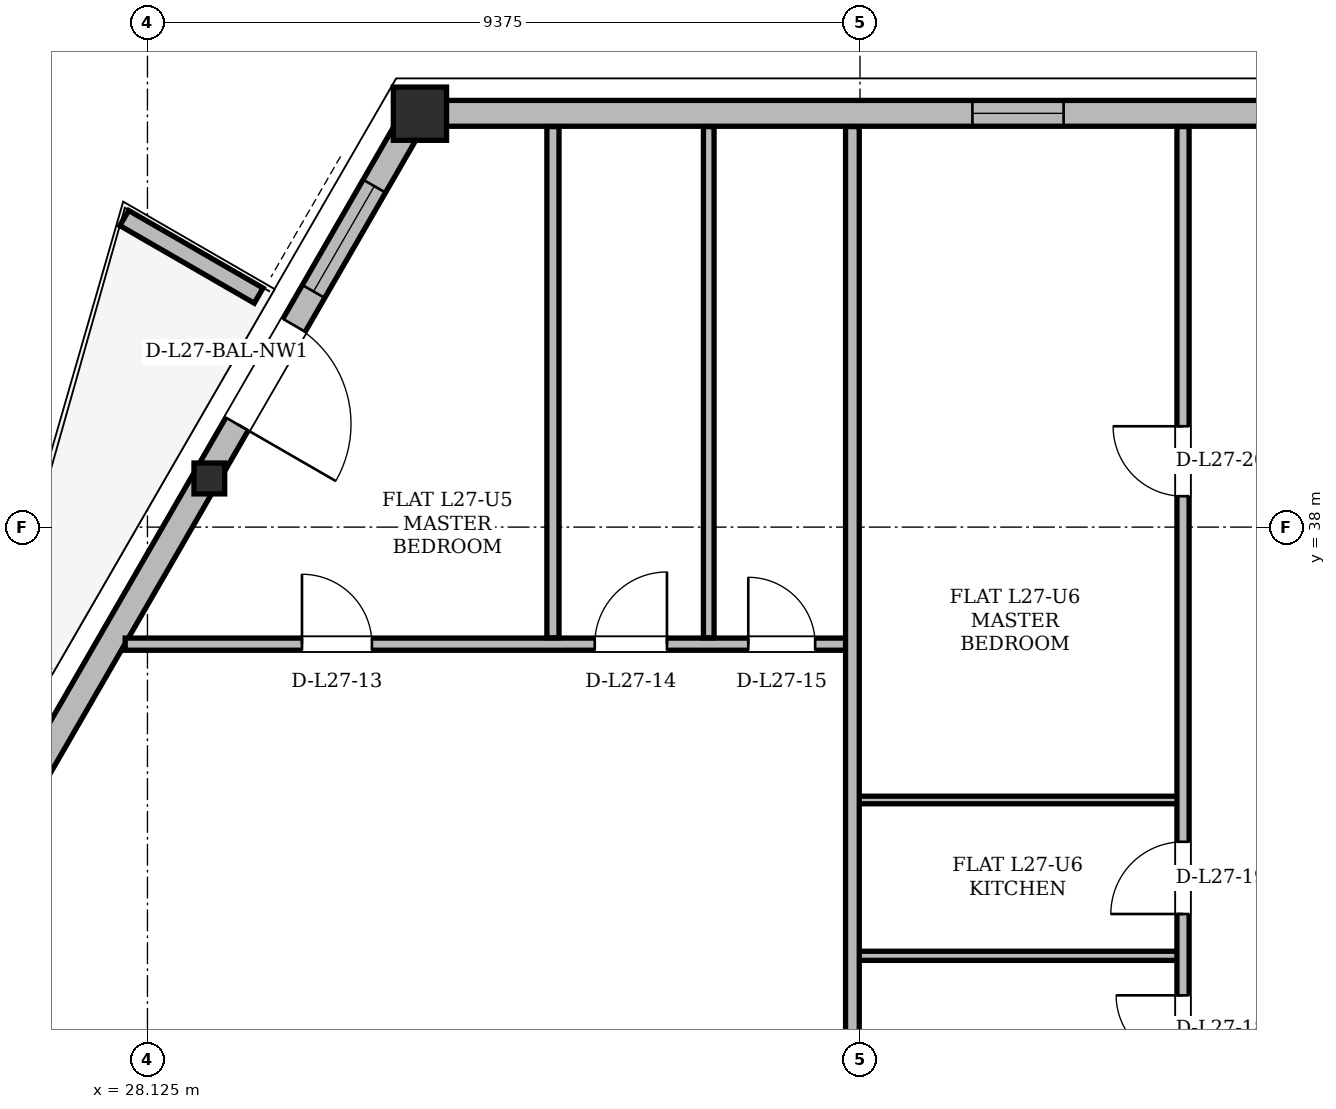
"""IFC4 building model, lengths in metres.
Left out: names, types, materials, properties, quantities, classifications, styles, units other than length and angle.
Written with IfcOpenShell. Run it as: python <this file> out.ifc"""

import sys

from ifc_helpers import new_model, si_unit, direction, frame, frame_2d, origin, origin_2d, place, context, subcontext, project, spatial, polyline, rectangle, hollow_rectangle, i_section, outline, extrude, element, fill, save


model = new_model("IFC4")
c1 = context("Model", 3, precision=1e-05, world=origin(), true_north=direction((0.0, 1.0)))
c2 = subcontext(c1, "Body", "Model", "MODEL_VIEW")
j1 = project(units=[si_unit("LENGTHUNIT", "METRE"), si_unit("PLANEANGLEUNIT", "RADIAN")], contexts=[c1])
p1 = place(None, origin())
s1 = spatial("IfcSite", under=j1, at=p1, CompositionType="ELEMENT")
p2 = place(p1, origin())
s2 = spatial("IfcBuilding", under=s1, at=p2, CompositionType="ELEMENT")
p3 = place(p2, frame((0.0, 0.0, 104.1)))
s3 = spatial("IfcBuildingStorey", under=s2, at=p3, CompositionType="ELEMENT", Elevation=104.1)
p4 = place(p3, frame((31.663, 43.444, 0.004), z_axis=(0.026165402281, -0.002582559186, 0.999654291299), x_axis=(0.098224011783, 0.995164329902, 0.0)))
e1 = element("IfcColumn", 1, at=p4, inside=s3, PredefinedType="COLUMN", context=c2, shape_type="SweptSolid", body=[
    extrude(hollow_rectangle(XDim=0.7, YDim=0.7, WallThickness=0.055, at=origin_2d()), origin(), (0.0, 0.0, 1.0), 3.592),
])
p5 = place(p3, frame((28.896, 38.65, 0.004), z_axis=(0.024399180592, -0.00557307189, 0.999686761369), x_axis=(0.222677327733, 0.974892203125, 0.0)))
e2 = element("IfcColumn", 2, at=p5, inside=s3, PredefinedType="COLUMN", context=c2, shape_type="SweptSolid", body=[
    extrude(i_section(OverallWidth=0.404, OverallDepth=0.406, WebThickness=0.027, FlangeThickness=0.044, at=origin_2d()), origin(), (0.0, 0.0, 1.0), 3.592),
])
p6 = place(p3, frame((43.337, 43.444, 0.0), z_axis=(0.0, 0.0, 1.0), x_axis=(-1.0, 0.0, 0.0)))
e3 = element("IfcWall", 3, at=p6, inside=s3, PredefinedType="SOLIDWALL", context=c2, shape_type="SweptSolid", body=[
    extrude(rectangle(XDim=11.674, YDim=0.34, at=frame_2d((5.837, 0.0))), origin(), (0.0, 0.0, 1.0), 2.578),
])
p7 = place(p6, frame((3.158, 0.0, 0.85)))
e4 = element("IfcOpeningElement", 4, at=p7, cuts=e3, PredefinedType="OPENING", context=c2, shape_type="SweptSolid", body=[
    extrude(rectangle(XDim=1.2, YDim=1.48, at=frame_2d((0.6, 0.74))), frame((0.0, 0.17, 0.0), z_axis=(0.0, -1.0, 0.0), x_axis=(1.0, 0.0, 0.0)), (0.0, 0.0, 1.0), 0.34),
])
p8 = place(p3, frame((31.663, 43.444, 0.0), z_axis=(0.0, 0.0, 1.0), x_axis=(-0.499998569178, -0.866026229868, 0.0)))
e5 = element("IfcWall", 5, at=p8, inside=s3, PredefinedType="SOLIDWALL", context=c2, shape_type="SweptSolid", body=[
    extrude(rectangle(XDim=34.595, YDim=0.34, at=frame_2d((17.298, 0.0))), origin(), (0.0, 0.0, 1.0), 2.578),
])
p9 = place(p8, frame((3.219, 0.0, 0.0)))
e6 = element("IfcOpeningElement", 6, at=p9, cuts=e5, PredefinedType="OPENING", context=c2, shape_type="SweptSolid", body=[
    extrude(rectangle(XDim=1.5, YDim=2.2, at=frame_2d((0.75, 1.1))), frame((0.0, 0.17, 0.0), z_axis=(0.0, -1.0, 0.0), x_axis=(1.0, 0.0, 0.0)), (0.0, 0.0, 1.0), 0.34),
])
p10 = place(p8, frame((25.061, 0.0, 0.0)))
e7 = element("IfcOpeningElement", 7, at=p10, cuts=e5, PredefinedType="OPENING", context=c2, shape_type="SweptSolid", body=[
    extrude(rectangle(XDim=1.5, YDim=2.2, at=frame_2d((0.75, 1.1))), frame((0.0, 0.17, 0.0), z_axis=(0.0, -1.0, 0.0), x_axis=(1.0, 0.0, 0.0)), (0.0, 0.0, 1.0), 0.34),
])
p11 = place(p8, frame((31.728, 0.0, 0.85)))
e8 = element("IfcOpeningElement", 8, at=p11, cuts=e5, PredefinedType="OPENING", context=c2, shape_type="SweptSolid", body=[
    extrude(rectangle(XDim=1.6, YDim=1.618, at=frame_2d((0.8, 0.809))), frame((0.0, 0.17, 0.0), z_axis=(0.0, -1.0, 0.0), x_axis=(1.0, 0.0, 0.0)), (0.0, 0.0, 1.0), 0.34),
])
p12 = place(p8, frame((26.86, 0.0, 0.85)))
e9 = element("IfcOpeningElement", 9, at=p12, cuts=e5, PredefinedType="OPENING", context=c2, shape_type="SweptSolid", body=[
    extrude(rectangle(XDim=1.2, YDim=1.48, at=frame_2d((0.6, 0.74))), frame((0.0, 0.17, 0.0), z_axis=(0.0, -1.0, 0.0), x_axis=(1.0, 0.0, 0.0)), (0.0, 0.0, 1.0), 0.34),
])
p13 = place(p8, frame((11.256, 0.0, 0.85)))
e10 = element("IfcOpeningElement", 10, at=p13, cuts=e5, PredefinedType="OPENING", context=c2, shape_type="SweptSolid", body=[
    extrude(rectangle(XDim=1.8, YDim=1.618, at=frame_2d((0.9, 0.809))), frame((0.0, 0.17, 0.0), z_axis=(0.0, -1.0, 0.0), x_axis=(1.0, 0.0, 0.0)), (0.0, 0.0, 1.0), 0.34),
])
p14 = place(p8, frame((18.593, 0.0, 0.85)))
e11 = element("IfcOpeningElement", 11, at=p14, cuts=e5, PredefinedType="OPENING", context=c2, shape_type="SweptSolid", body=[
    extrude(rectangle(XDim=1.2, YDim=1.48, at=frame_2d((0.6, 0.74))), frame((0.0, 0.17, 0.0), z_axis=(0.0, -1.0, 0.0), x_axis=(1.0, 0.0, 0.0)), (0.0, 0.0, 1.0), 0.34),
])
p15 = place(p8, frame((1.106, 0.0, 0.85)))
e12 = element("IfcOpeningElement", 12, at=p15, cuts=e5, PredefinedType="OPENING", context=c2, shape_type="SweptSolid", body=[
    extrude(rectangle(XDim=1.6, YDim=1.618, at=frame_2d((0.8, 0.809))), frame((0.0, 0.17, 0.0), z_axis=(0.0, -1.0, 0.0), x_axis=(1.0, 0.0, 0.0)), (0.0, 0.0, 1.0), 0.34),
])
p16 = place(p3, frame((29.588, 41.045, 0.0), z_axis=(0.0, 0.0, 1.0), x_axis=(-0.866012356593, 0.500022597718, 0.0)))
e13 = element("IfcWall", 13, at=p16, inside=s3, PredefinedType="PARAPET", context=c2, shape_type="SweptSolid", body=[
    extrude(outline(polyline([(0.0, 0.0), (2.042, 0.0), (2.042, 1.1), (0.0, 1.32), (0.0, 0.0)])), frame((0.0, 0.115, 0.0), z_axis=(0.0, -1.0, 0.0), x_axis=(1.0, 0.0, 0.0)), (0.0, 0.0, 1.0), 0.23),
])
p17 = place(p3, frame((37.35, 32.36, 0.0), z_axis=(0.0, 0.0, 1.0), x_axis=(1.0, 0.0, 0.0)))
e14 = element("IfcWall", 14, at=p17, inside=s3, PredefinedType="PARTITIONING", context=c2, shape_type="SweptSolid", body=[
    extrude(rectangle(XDim=4.4, YDim=0.12, at=frame_2d((2.2, 0.0))), origin(), (0.0, 0.0, 1.0), 3.36),
])
p18 = place(p3, frame((37.35, 34.41, 0.0), z_axis=(0.0, 0.0, 1.0), x_axis=(1.0, 0.0, 0.0)))
e15 = element("IfcWall", 15, at=p18, inside=s3, PredefinedType="PARTITIONING", context=c2, shape_type="SweptSolid", body=[
    extrude(rectangle(XDim=4.4, YDim=0.1, at=frame_2d((2.2, 0.0))), origin(), (0.0, 0.0, 1.0), 3.36),
])
p19 = place(p3, frame((27.832, 36.46, 0.0), z_axis=(0.0, 0.0, 1.0), x_axis=(1.0, 0.0, 0.0)))
e16 = element("IfcWall", 16, at=p19, inside=s3, PredefinedType="PARTITIONING", context=c2, shape_type="SweptSolid", body=[
    extrude(rectangle(XDim=9.618, YDim=0.16, at=frame_2d((4.809, 0.0))), origin(), (0.0, 0.0, 1.0), 2.814),
])
p20 = place(p19, frame((2.326, 0.0, 0.0)))
e17 = element("IfcOpeningElement", 17, at=p20, cuts=e16, PredefinedType="OPENING", context=c2, shape_type="SweptSolid", body=[
    extrude(rectangle(XDim=0.92, YDim=2.12, at=frame_2d((0.46, 1.06))), frame((0.0, 0.08, 0.0), z_axis=(0.0, -1.0, 0.0), x_axis=(1.0, 0.0, 0.0)), (0.0, 0.0, 1.0), 0.16),
])
p21 = place(p19, frame((6.178, 0.0, 0.0)))
e18 = element("IfcOpeningElement", 18, at=p21, cuts=e16, PredefinedType="OPENING", context=c2, shape_type="SweptSolid", body=[
    extrude(rectangle(XDim=0.95, YDim=2.1, at=frame_2d((0.475, 1.05))), frame((0.0, 0.08, 0.0), z_axis=(0.0, -1.0, 0.0), x_axis=(1.0, 0.0, 0.0)), (0.0, 0.0, 1.0), 0.16),
])
p22 = place(p19, frame((8.198, 0.0, 0.0)))
e19 = element("IfcOpeningElement", 19, at=p22, cuts=e16, PredefinedType="OPENING", context=c2, shape_type="SweptSolid", body=[
    extrude(rectangle(XDim=0.88, YDim=2.08, at=frame_2d((0.44, 1.04))), frame((0.0, 0.08, 0.0), z_axis=(0.0, -1.0, 0.0), x_axis=(1.0, 0.0, 0.0)), (0.0, 0.0, 1.0), 0.16),
])
p23 = place(p3, frame((33.46, 36.544, 0.0), z_axis=(0.0, 0.0, 1.0), x_axis=(0.0, 1.0, 0.0)))
e20 = element("IfcWall", 20, at=p23, inside=s3, PredefinedType="PARTITIONING", context=c2, shape_type="SweptSolid", body=[
    extrude(rectangle(XDim=6.726, YDim=0.16, at=frame_2d((3.363, 0.0))), origin(), (0.0, 0.0, 1.0), 3.36),
])
p24 = place(p3, frame((35.51, 36.544, 0.0), z_axis=(0.0, 0.0, 1.0), x_axis=(0.0, 1.0, 0.0)))
e21 = element("IfcWall", 21, at=p24, inside=s3, PredefinedType="PARTITIONING", context=c2, shape_type="SweptSolid", body=[
    extrude(rectangle(XDim=6.726, YDim=0.14, at=frame_2d((3.363, 0.0))), origin(), (0.0, 0.0, 1.0), 3.36),
])
p25 = place(p3, frame((37.4, 26.064, 0.0), z_axis=(0.0, 0.0, 1.0), x_axis=(0.0, 1.0, 0.0)))
e22 = element("IfcWall", 22, at=p25, inside=s3, PredefinedType="PARTITIONING", context=c2, shape_type="SweptSolid", body=[
    extrude(rectangle(XDim=17.206, YDim=0.18, at=frame_2d((8.603, 0.0))), origin(), (0.0, 0.0, 1.0), 3.36),
])
p26 = place(p3, frame((41.75, 30.564, 0.0), z_axis=(0.0, 0.0, 1.0), x_axis=(0.0, 1.0, 0.0)))
e23 = element("IfcWall", 23, at=p26, inside=s3, PredefinedType="PARTITIONING", context=c2, shape_type="SweptSolid", body=[
    extrude(rectangle(XDim=12.706, YDim=0.16, at=frame_2d((6.353, 0.0))), origin(), (0.0, 0.0, 1.0), 3.36),
])
p27 = place(p26, frame((0.396, 0.0, 0.0)))
e24 = element("IfcOpeningElement", 24, at=p27, cuts=e23, PredefinedType="OPENING", context=c2, shape_type="SweptSolid", body=[
    extrude(rectangle(XDim=0.88, YDim=2.08, at=frame_2d((0.44, 1.04))), frame((0.0, 0.08, 0.0), z_axis=(0.0, -1.0, 0.0), x_axis=(1.0, 0.0, 0.0)), (0.0, 0.0, 1.0), 0.16),
])
p28 = place(p26, frame((2.346, 0.0, 0.0)))
e25 = element("IfcOpeningElement", 25, at=p28, cuts=e23, PredefinedType="OPENING", context=c2, shape_type="SweptSolid", body=[
    extrude(rectangle(XDim=0.95, YDim=2.1, at=frame_2d((0.475, 1.05))), frame((0.0, 0.08, 0.0), z_axis=(0.0, -1.0, 0.0), x_axis=(1.0, 0.0, 0.0)), (0.0, 0.0, 1.0), 0.16),
])
p29 = place(p26, frame((7.843, 0.0, 0.0)))
e26 = element("IfcOpeningElement", 26, at=p29, cuts=e23, PredefinedType="OPENING", context=c2, shape_type="SweptSolid", body=[
    extrude(rectangle(XDim=0.92, YDim=2.12, at=frame_2d((0.46, 1.06))), frame((0.0, 0.08, 0.0), z_axis=(0.0, -1.0, 0.0), x_axis=(1.0, 0.0, 0.0)), (0.0, 0.0, 1.0), 0.16),
])
p30 = place(p9, origin())
e27 = element("IfcDoor", 27, at=p30, inside=s3, OperationType="SINGLE_SWING_RIGHT", PredefinedType="DOOR", context=c2, shape_type="SweptSolid", body=[
    extrude(rectangle(XDim=1.5, YDim=2.2, at=frame_2d((0.75, 1.1))), frame((0.0, 0.025, 0.0), z_axis=(0.0, -1.0, 0.0), x_axis=(1.0, 0.0, 0.0)), (0.0, 0.0, 1.0), 0.05),
])
fill(e6, e27)
p31 = place(p15, origin())
e28 = element("IfcWindow", 28, at=p31, inside=s3, PartitioningType="SINGLE_PANEL", PredefinedType="WINDOW", context=c2, shape_type="SweptSolid", body=[
    extrude(rectangle(XDim=1.6, YDim=1.618, at=frame_2d((0.8, 0.809))), frame((0.0, 0.03, 0.0), z_axis=(0.0, -1.0, 0.0), x_axis=(1.0, 0.0, 0.0)), (0.0, 0.0, 1.0), 0.06),
])
fill(e12, e28)
p32 = place(p7, origin())
e29 = element("IfcWindow", 29, at=p32, inside=s3, PartitioningType="SINGLE_PANEL", PredefinedType="WINDOW", context=c2, shape_type="SweptSolid", body=[
    extrude(rectangle(XDim=1.2, YDim=1.48, at=frame_2d((0.6, 0.74))), frame((0.0, 0.03, 0.0), z_axis=(0.0, -1.0, 0.0), x_axis=(1.0, 0.0, 0.0)), (0.0, 0.0, 1.0), 0.06),
])
fill(e4, e29)
p33 = place(p20, origin())
e30 = element("IfcDoor", 30, at=p33, inside=s3, OperationType="SINGLE_SWING_LEFT", PredefinedType="DOOR", context=c2, shape_type="SweptSolid", body=[
    extrude(rectangle(XDim=0.92, YDim=2.12, at=frame_2d((0.46, 1.06))), frame((0.0, 0.025, 0.0), z_axis=(0.0, -1.0, 0.0), x_axis=(1.0, 0.0, 0.0)), (0.0, 0.0, 1.0), 0.05),
])
fill(e17, e30)
p34 = place(p21, origin())
e31 = element("IfcDoor", 31, at=p34, inside=s3, OperationType="SINGLE_SWING_RIGHT", PredefinedType="DOOR", context=c2, shape_type="SweptSolid", body=[
    extrude(rectangle(XDim=0.95, YDim=2.1, at=frame_2d((0.475, 1.05))), frame((0.0, 0.025, 0.0), z_axis=(0.0, -1.0, 0.0), x_axis=(1.0, 0.0, 0.0)), (0.0, 0.0, 1.0), 0.05),
])
fill(e18, e31)
p35 = place(p22, origin())
e32 = element("IfcDoor", 32, at=p35, inside=s3, OperationType="SINGLE_SWING_LEFT", PredefinedType="DOOR", context=c2, shape_type="SweptSolid", body=[
    extrude(rectangle(XDim=0.88, YDim=2.08, at=frame_2d((0.44, 1.04))), frame((0.0, 0.025, 0.0), z_axis=(0.0, -1.0, 0.0), x_axis=(1.0, 0.0, 0.0)), (0.0, 0.0, 1.0), 0.05),
])
fill(e19, e32)
p36 = place(p27, origin())
e33 = element("IfcDoor", 33, at=p36, inside=s3, OperationType="SINGLE_SWING_RIGHT", PredefinedType="DOOR", context=c2, shape_type="SweptSolid", body=[
    extrude(rectangle(XDim=0.88, YDim=2.08, at=frame_2d((0.44, 1.04))), frame((0.0, 0.025, 0.0), z_axis=(0.0, -1.0, 0.0), x_axis=(1.0, 0.0, 0.0)), (0.0, 0.0, 1.0), 0.05),
])
fill(e24, e33)
p37 = place(p28, origin())
e34 = element("IfcDoor", 34, at=p37, inside=s3, OperationType="SINGLE_SWING_LEFT", PredefinedType="DOOR", context=c2, shape_type="SweptSolid", body=[
    extrude(rectangle(XDim=0.95, YDim=2.1, at=frame_2d((0.475, 1.05))), frame((0.0, 0.025, 0.0), z_axis=(0.0, -1.0, 0.0), x_axis=(1.0, 0.0, 0.0)), (0.0, 0.0, 1.0), 0.05),
])
fill(e25, e34)
p38 = place(p29, origin())
e35 = element("IfcDoor", 35, at=p38, inside=s3, OperationType="SINGLE_SWING_RIGHT", PredefinedType="DOOR", context=c2, shape_type="SweptSolid", body=[
    extrude(rectangle(XDim=0.92, YDim=2.12, at=frame_2d((0.46, 1.06))), frame((0.0, 0.025, 0.0), z_axis=(0.0, -1.0, 0.0), x_axis=(1.0, 0.0, 0.0)), (0.0, 0.0, 1.0), 0.05),
])
fill(e26, e35)
save(model, sys.argv[1])
